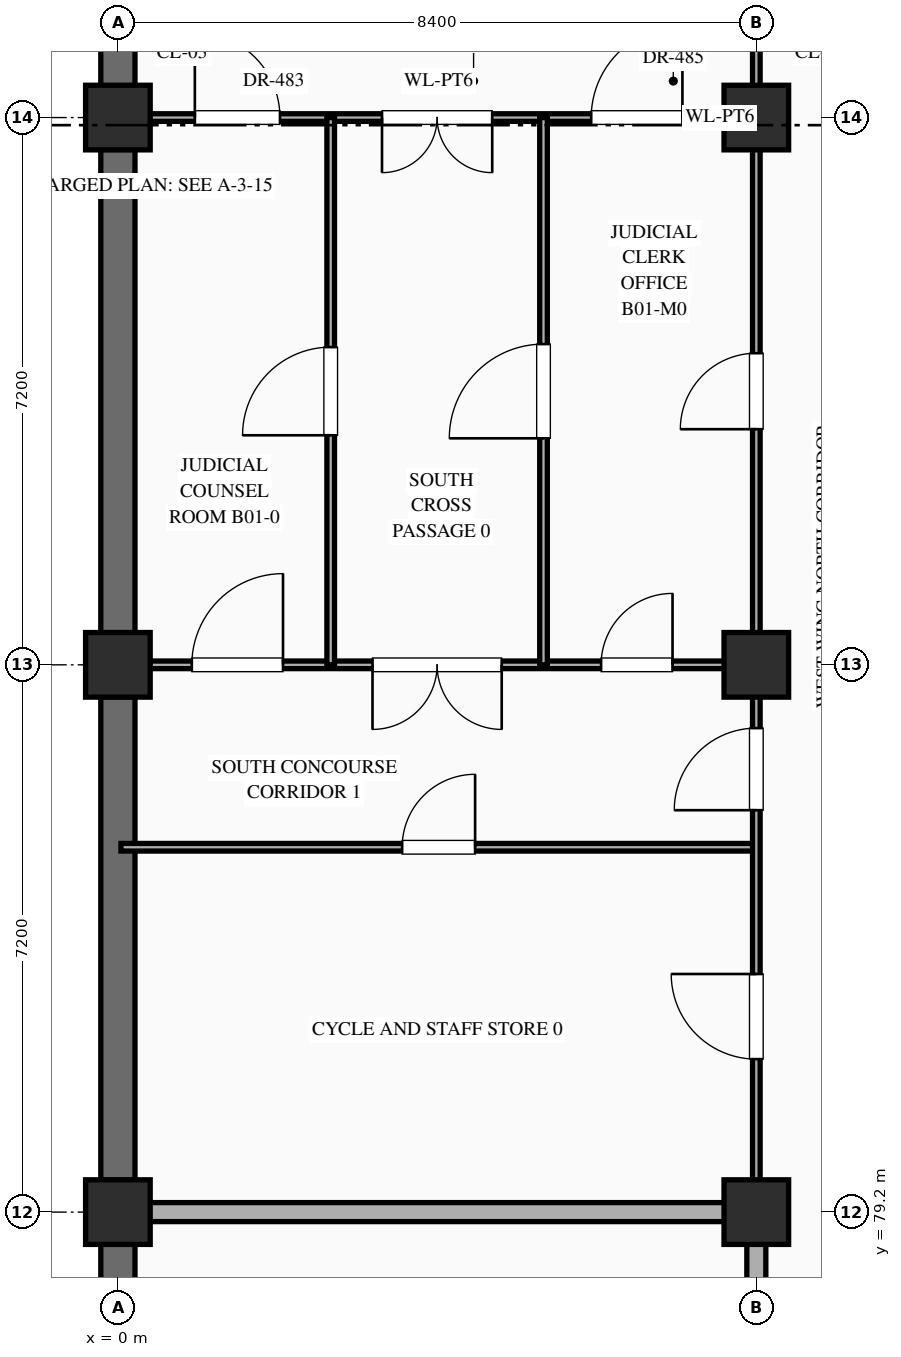
"""IFC4 building model, lengths in metres.
Left out: names, types, materials, properties, quantities, classifications, styles, units other than length and angle.
Written with IfcOpenShell. Run it as: python <this file> out.ifc"""

import sys

from ifc_helpers import new_model, si_unit, direction, frame, frame_2d, origin, origin_2d, place, context, subcontext, project, spatial, rectangle, extrude, element, fill, save


model = new_model("IFC4")
c1 = context("Model", 3, precision=1e-05, world=origin(), true_north=direction((0.0, 1.0)))
c2 = subcontext(c1, "Body", "Model", "MODEL_VIEW")
j1 = project(units=[si_unit("LENGTHUNIT", "METRE"), si_unit("PLANEANGLEUNIT", "RADIAN")], contexts=[c1])
p1 = place(None, origin())
s1 = spatial("IfcSite", under=j1, at=p1, CompositionType="ELEMENT")
p2 = place(p1, origin())
s2 = spatial("IfcBuilding", under=s1, at=p2, CompositionType="ELEMENT")
p3 = place(p2, frame((0.0, 0.0, -5.4)))
s3 = spatial("IfcBuildingStorey", under=s2, at=p3, CompositionType="ELEMENT", Elevation=-5.4)
for number, where, z_axis, x_axis in (
    (1, (0.0, 79.2, 0.0), (0.0, 0.0, 1.0), (1.0, 0.0, 0.0)),
    (2, (0.0, 86.4, 0.0), (0.0, 0.0, 1.0), (1.0, 0.0, 0.0)),
    (3, (0.0, 93.6, 0.0), (0.0, 0.0, 1.0), (1.0, 0.0, 0.0)),
    (4, (8.4, 79.2, 0.0), (0.0, 0.0, 1.0), (1.0, 0.0, 0.0)),
    (5, (8.4, 86.4, 0.0), (0.0, 0.0, 1.0), (1.0, 0.0, 0.0)),
    (6, (8.4, 93.6, 0.0), (0.0, 0.0, 1.0), (1.0, 0.0, 0.0)),
):
    element("IfcColumn", number, at=place(p3, frame(where, z_axis=z_axis, x_axis=x_axis)), inside=s3, PredefinedType="COLUMN", context=c2, shape_type="SweptSolid", body=[
        extrude(rectangle(XDim=0.85, YDim=0.85, at=origin_2d()), origin(), (0.0, 0.0, 1.0), 5.4),
    ])
p4 = place(p3, frame((0.0, 72.42, 0.0), z_axis=(0.0, 0.0, 1.0), x_axis=(0.0, 1.0, 0.0)))
e7 = element("IfcWall", 7, at=p4, inside=s3, PredefinedType="USERDEFINED", context=c2, shape_type="SweptSolid", body=[
    extrude(rectangle(XDim=6.36, YDim=0.45, at=frame_2d((3.18, 0.0))), origin(), (0.0, 0.0, 1.0), 5.1),
])
for number, where, z_axis, x_axis in (
    (8, (0.0, 79.62, 0.0), (0.0, 0.0, 1.0), (0.0, 1.0, 0.0)),
    (9, (0.0, 86.82, 0.0), (0.0, 0.0, 1.0), (0.0, 1.0, 0.0)),
    (10, (0.0, 94.02, 0.0), (0.0, 0.0, 1.0), (0.0, 1.0, 0.0)),
):
    element("IfcWall", number, at=place(p3, frame(where, z_axis=z_axis, x_axis=x_axis)), inside=s3, PredefinedType="USERDEFINED", context=c2, shape_type="SweptSolid", body=[
        extrude(rectangle(XDim=6.36, YDim=0.45, at=frame_2d((3.18, 0.0))), origin(), (0.0, 0.0, 1.0), 5.1),
    ])
p5 = place(p3, frame((0.04, 79.2, 0.0), z_axis=(0.0, 0.0, 1.0), x_axis=(1.0, 0.0, 0.0)))
e11 = element("IfcWall", 11, at=p5, inside=s3, PredefinedType="STANDARD", context=c2, shape_type="SweptSolid", body=[
    extrude(rectangle(XDim=8.36, YDim=0.25, at=frame_2d((4.18, 0.0))), origin(), (0.0, 0.0, 1.0), 4.25),
])
p6 = place(p3, frame((0.04, 84.0, 0.0), z_axis=(0.0, 0.0, 1.0), x_axis=(1.0, 0.0, 0.0)))
e12 = element("IfcWall", 12, at=p6, inside=s3, PredefinedType="STANDARD", context=c2, shape_type="SweptSolid", body=[
    extrude(rectangle(XDim=8.36, YDim=0.1, at=frame_2d((4.18, 0.0))), origin(), (0.0, 0.0, 1.0), 5.1),
])
p7 = place(p6, frame((3.7, 0.0, 0.0)))
e13 = element("IfcOpeningElement", 13, at=p7, cuts=e12, PredefinedType="OPENING", context=c2, shape_type="SweptSolid", body=[
    extrude(rectangle(XDim=0.96, YDim=2.2, at=frame_2d((0.48, 1.1))), frame((0.0, 0.062, 0.0), z_axis=(0.0, -1.0, 0.0), x_axis=(1.0, 0.0, 0.0)), (0.0, 0.0, 1.0), 0.124),
])
p8 = place(p3, frame((0.04, 86.4, 0.0), z_axis=(0.0, 0.0, 1.0), x_axis=(1.0, 0.0, 0.0)))
e14 = element("IfcWall", 14, at=p8, inside=s3, PredefinedType="STANDARD", context=c2, shape_type="SweptSolid", body=[
    extrude(rectangle(XDim=8.36, YDim=0.1, at=frame_2d((4.18, 0.0))), origin(), (0.0, 0.0, 1.0), 4.25),
])
p9 = place(p8, frame((0.933, 0.0, 0.0)))
e15 = element("IfcOpeningElement", 15, at=p9, cuts=e14, PredefinedType="OPENING", context=c2, shape_type="SweptSolid", body=[
    extrude(rectangle(XDim=1.2, YDim=2.35, at=frame_2d((0.6, 1.175))), frame((0.0, 0.062, 0.0), z_axis=(0.0, -1.0, 0.0), x_axis=(1.0, 0.0, 0.0)), (0.0, 0.0, 1.0), 0.124),
])
p10 = place(p8, frame((3.31, 0.0, 0.0)))
e16 = element("IfcOpeningElement", 16, at=p10, cuts=e14, PredefinedType="OPENING", context=c2, shape_type="SweptSolid", body=[
    extrude(rectangle(XDim=1.7, YDim=2.45, at=frame_2d((0.85, 1.225))), frame((0.0, 0.062, 0.0), z_axis=(0.0, -1.0, 0.0), x_axis=(1.0, 0.0, 0.0)), (0.0, 0.0, 1.0), 0.124),
])
p11 = place(p8, frame((6.317, 0.0, 0.0)))
e17 = element("IfcOpeningElement", 17, at=p11, cuts=e14, PredefinedType="OPENING", context=c2, shape_type="SweptSolid", body=[
    extrude(rectangle(XDim=0.94, YDim=2.3, at=frame_2d((0.47, 1.15))), frame((0.0, 0.062, 0.0), z_axis=(0.0, -1.0, 0.0), x_axis=(1.0, 0.0, 0.0)), (0.0, 0.0, 1.0), 0.124),
])
p12 = place(p3, frame((0.04, 93.6, 0.0), z_axis=(0.0, 0.0, 1.0), x_axis=(1.0, 0.0, 0.0)))
e18 = element("IfcWall", 18, at=p12, inside=s3, PredefinedType="STANDARD", context=c2, shape_type="SweptSolid", body=[
    extrude(rectangle(XDim=8.36, YDim=0.1, at=frame_2d((4.18, 0.0))), origin(), (0.0, 0.0, 1.0), 4.25),
])
p13 = place(p12, frame((0.972, 0.0, 0.0)))
e19 = element("IfcOpeningElement", 19, at=p13, cuts=e18, PredefinedType="OPENING", context=c2, shape_type="SweptSolid", body=[
    extrude(rectangle(XDim=1.12, YDim=2.25, at=frame_2d((0.56, 1.125))), frame((0.0, 0.062, 0.0), z_axis=(0.0, -1.0, 0.0), x_axis=(1.0, 0.0, 0.0)), (0.0, 0.0, 1.0), 0.124),
])
p14 = place(p12, frame((3.435, 0.0, 0.0)))
e20 = element("IfcOpeningElement", 20, at=p14, cuts=e18, PredefinedType="OPENING", context=c2, shape_type="SweptSolid", body=[
    extrude(rectangle(XDim=1.45, YDim=2.3, at=frame_2d((0.725, 1.15))), frame((0.0, 0.062, 0.0), z_axis=(0.0, -1.0, 0.0), x_axis=(1.0, 0.0, 0.0)), (0.0, 0.0, 1.0), 0.124),
])
p15 = place(p12, frame((6.188, 0.0, 0.0)))
e21 = element("IfcOpeningElement", 21, at=p15, cuts=e18, PredefinedType="OPENING", context=c2, shape_type="SweptSolid", body=[
    extrude(rectangle(XDim=1.2, YDim=2.35, at=frame_2d((0.6, 1.175))), frame((0.0, 0.062, 0.0), z_axis=(0.0, -1.0, 0.0), x_axis=(1.0, 0.0, 0.0)), (0.0, 0.0, 1.0), 0.124),
])
p16 = place(p3, frame((2.8, 86.4, 0.0), z_axis=(0.0, 0.0, 1.0), x_axis=(0.0, 1.0, 0.0)))
e22 = element("IfcWall", 22, at=p16, inside=s3, PredefinedType="STANDARD", context=c2, shape_type="SweptSolid", body=[
    extrude(rectangle(XDim=7.2, YDim=0.1, at=frame_2d((3.6, 0.0))), origin(), (0.0, 0.0, 1.0), 5.1),
])
p17 = place(p16, frame((3.02, 0.0, 0.0)))
e23 = element("IfcOpeningElement", 23, at=p17, cuts=e22, PredefinedType="OPENING", context=c2, shape_type="SweptSolid", body=[
    extrude(rectangle(XDim=1.16, YDim=2.3, at=frame_2d((0.58, 1.15))), frame((0.0, 0.062, 0.0), z_axis=(0.0, -1.0, 0.0), x_axis=(1.0, 0.0, 0.0)), (0.0, 0.0, 1.0), 0.124),
])
p18 = place(p3, frame((5.6, 86.4, 0.0), z_axis=(0.0, 0.0, 1.0), x_axis=(0.0, 1.0, 0.0)))
e24 = element("IfcWall", 24, at=p18, inside=s3, PredefinedType="STANDARD", context=c2, shape_type="SweptSolid", body=[
    extrude(rectangle(XDim=7.2, YDim=0.1, at=frame_2d((3.6, 0.0))), origin(), (0.0, 0.0, 1.0), 5.1),
])
p19 = place(p18, frame((2.98, 0.0, 0.0)))
e25 = element("IfcOpeningElement", 25, at=p19, cuts=e24, PredefinedType="OPENING", context=c2, shape_type="SweptSolid", body=[
    extrude(rectangle(XDim=1.24, YDim=2.3, at=frame_2d((0.62, 1.15))), frame((0.0, 0.062, 0.0), z_axis=(0.0, -1.0, 0.0), x_axis=(1.0, 0.0, 0.0)), (0.0, 0.0, 1.0), 0.124),
])
p20 = place(p3, frame((8.4, 40.8, 0.0), z_axis=(0.0, 0.0, 1.0), x_axis=(0.0, 1.0, 0.0)))
e26 = element("IfcWall", 26, at=p20, inside=s3, PredefinedType="STANDARD", context=c2, shape_type="SweptSolid", body=[
    extrude(rectangle(XDim=38.4, YDim=0.25, at=frame_2d((19.2, 0.0))), origin(), (0.0, 0.0, 1.0), 4.35),
])
p21 = place(p20, frame((0.528, 0.0, 0.0)))
e27 = element("IfcOpeningElement", 27, at=p21, cuts=e26, PredefinedType="OPENING", context=c2, shape_type="SweptSolid", body=[
    extrude(rectangle(XDim=1.0, YDim=2.2, at=frame_2d((0.5, 1.1))), frame((0.0, 0.137, 0.0), z_axis=(0.0, -1.0, 0.0), x_axis=(1.0, 0.0, 0.0)), (0.0, 0.0, 1.0), 0.274),
])
p22 = place(p20, frame((27.1, 0.0, 0.0)))
e28 = element("IfcOpeningElement", 28, at=p22, cuts=e26, PredefinedType="OPENING", context=c2, shape_type="SweptSolid", body=[
    extrude(rectangle(XDim=1.0, YDim=2.2, at=frame_2d((0.5, 1.1))), frame((0.0, 0.137, 0.0), z_axis=(0.0, -1.0, 0.0), x_axis=(1.0, 0.0, 0.0)), (0.0, 0.0, 1.0), 0.274),
])
p23 = place(p20, frame((12.65, 0.0, 0.0)))
e29 = element("IfcOpeningElement", 29, at=p23, cuts=e26, PredefinedType="OPENING", context=c2, shape_type="SweptSolid", body=[
    extrude(rectangle(XDim=1.1, YDim=2.2, at=frame_2d((0.55, 1.1))), frame((0.0, 0.137, 0.0), z_axis=(0.0, -1.0, 0.0), x_axis=(1.0, 0.0, 0.0)), (0.0, 0.0, 1.0), 0.274),
])
p24 = place(p3, frame((8.4, 79.2, 0.0), z_axis=(0.0, 0.0, 1.0), x_axis=(0.0, 1.0, 0.0)))
e30 = element("IfcWall", 30, at=p24, inside=s3, PredefinedType="STANDARD", context=c2, shape_type="SweptSolid", body=[
    extrude(rectangle(XDim=28.8, YDim=0.1, at=frame_2d((14.4, 0.0))), origin(), (0.0, 0.0, 1.0), 4.35),
])
p25 = place(p24, frame((22.522, 0.0, 0.0)))
e31 = element("IfcOpeningElement", 31, at=p25, cuts=e30, PredefinedType="OPENING", context=c2, shape_type="SweptSolid", body=[
    extrude(rectangle(XDim=0.9, YDim=2.15, at=frame_2d((0.45, 1.075))), frame((0.0, 0.062, 0.0), z_axis=(0.0, -1.0, 0.0), x_axis=(1.0, 0.0, 0.0)), (0.0, 0.0, 1.0), 0.124),
])
p26 = place(p24, frame((25.798, 0.0, 0.0)))
e32 = element("IfcOpeningElement", 32, at=p26, cuts=e30, PredefinedType="OPENING", context=c2, shape_type="SweptSolid", body=[
    extrude(rectangle(XDim=0.86, YDim=2.1, at=frame_2d((0.43, 1.05))), frame((0.0, 0.062, 0.0), z_axis=(0.0, -1.0, 0.0), x_axis=(1.0, 0.0, 0.0)), (0.0, 0.0, 1.0), 0.124),
])
p27 = place(p24, frame((15.312, 0.0, 0.0)))
e33 = element("IfcOpeningElement", 33, at=p27, cuts=e30, PredefinedType="OPENING", context=c2, shape_type="SweptSolid", body=[
    extrude(rectangle(XDim=0.92, YDim=2.15, at=frame_2d((0.46, 1.075))), frame((0.0, 0.062, 0.0), z_axis=(0.0, -1.0, 0.0), x_axis=(1.0, 0.0, 0.0)), (0.0, 0.0, 1.0), 0.124),
])
p28 = place(p24, frame((18.548, 0.0, 0.0)))
e34 = element("IfcOpeningElement", 34, at=p28, cuts=e30, PredefinedType="OPENING", context=c2, shape_type="SweptSolid", body=[
    extrude(rectangle(XDim=0.96, YDim=2.2, at=frame_2d((0.48, 1.1))), frame((0.0, 0.062, 0.0), z_axis=(0.0, -1.0, 0.0), x_axis=(1.0, 0.0, 0.0)), (0.0, 0.0, 1.0), 0.124),
])
p29 = place(p24, frame((10.3, 0.0, 0.0)))
e35 = element("IfcOpeningElement", 35, at=p29, cuts=e30, PredefinedType="OPENING", context=c2, shape_type="SweptSolid", body=[
    extrude(rectangle(XDim=1.0, YDim=2.25, at=frame_2d((0.5, 1.125))), frame((0.0, 0.062, 0.0), z_axis=(0.0, -1.0, 0.0), x_axis=(1.0, 0.0, 0.0)), (0.0, 0.0, 1.0), 0.124),
])
p30 = place(p24, frame((5.288, 0.0, 0.0)))
e36 = element("IfcOpeningElement", 36, at=p30, cuts=e30, PredefinedType="OPENING", context=c2, shape_type="SweptSolid", body=[
    extrude(rectangle(XDim=1.08, YDim=2.25, at=frame_2d((0.54, 1.125))), frame((0.0, 0.062, 0.0), z_axis=(0.0, -1.0, 0.0), x_axis=(1.0, 0.0, 0.0)), (0.0, 0.0, 1.0), 0.124),
])
p31 = place(p24, frame((2.012, 0.0, 0.0)))
e37 = element("IfcOpeningElement", 37, at=p31, cuts=e30, PredefinedType="OPENING", context=c2, shape_type="SweptSolid", body=[
    extrude(rectangle(XDim=1.12, YDim=2.25, at=frame_2d((0.56, 1.125))), frame((0.0, 0.062, 0.0), z_axis=(0.0, -1.0, 0.0), x_axis=(1.0, 0.0, 0.0)), (0.0, 0.0, 1.0), 0.124),
])
p32 = place(p29, origin())
e38 = element("IfcDoor", 38, at=p32, inside=s3, OperationType="SINGLE_SWING_LEFT", PredefinedType="DOOR", context=c2, shape_type="SweptSolid", body=[
    extrude(rectangle(XDim=1.0, YDim=2.25, at=frame_2d((0.5, 1.125))), frame((0.0, 0.025, 0.0), z_axis=(0.0, -1.0, 0.0), x_axis=(1.0, 0.0, 0.0)), (0.0, 0.0, 1.0), 0.05),
])
fill(e35, e38)
p33 = place(p30, origin())
e39 = element("IfcDoor", 39, at=p33, inside=s3, OperationType="SINGLE_SWING_LEFT", PredefinedType="DOOR", context=c2, shape_type="SweptSolid", body=[
    extrude(rectangle(XDim=1.08, YDim=2.25, at=frame_2d((0.54, 1.125))), frame((0.0, 0.025, 0.0), z_axis=(0.0, -1.0, 0.0), x_axis=(1.0, 0.0, 0.0)), (0.0, 0.0, 1.0), 0.05),
])
fill(e36, e39)
p34 = place(p31, origin())
e40 = element("IfcDoor", 40, at=p34, inside=s3, OperationType="SINGLE_SWING_RIGHT", PredefinedType="DOOR", context=c2, shape_type="SweptSolid", body=[
    extrude(rectangle(XDim=1.12, YDim=2.25, at=frame_2d((0.56, 1.125))), frame((0.0, 0.025, 0.0), z_axis=(0.0, -1.0, 0.0), x_axis=(1.0, 0.0, 0.0)), (0.0, 0.0, 1.0), 0.05),
])
fill(e37, e40)
p35 = place(p13, origin())
e41 = element("IfcDoor", 41, at=p35, inside=s3, OperationType="SINGLE_SWING_LEFT", PredefinedType="DOOR", context=c2, shape_type="SweptSolid", body=[
    extrude(rectangle(XDim=1.12, YDim=2.25, at=frame_2d((0.56, 1.125))), frame((0.0, 0.025, 0.0), z_axis=(0.0, -1.0, 0.0), x_axis=(1.0, 0.0, 0.0)), (0.0, 0.0, 1.0), 0.05),
])
fill(e19, e41)
p36 = place(p14, frame((1.45, 0.0, 0.0), z_axis=(0.0, 0.0, 1.0), x_axis=(-1.0, 0.0, 0.0)))
e42 = element("IfcDoor", 42, at=p36, inside=s3, OperationType="DOUBLE_DOOR_SINGLE_SWING", PredefinedType="DOOR", context=c2, shape_type="SweptSolid", body=[
    extrude(rectangle(XDim=1.45, YDim=2.3, at=frame_2d((0.725, 1.15))), frame((0.0, 0.025, 0.0), z_axis=(0.0, -1.0, 0.0), x_axis=(1.0, 0.0, 0.0)), (0.0, 0.0, 1.0), 0.05),
])
fill(e20, e42)
p37 = place(p15, origin())
e43 = element("IfcDoor", 43, at=p37, inside=s3, OperationType="SINGLE_SWING_RIGHT", PredefinedType="DOOR", context=c2, shape_type="SweptSolid", body=[
    extrude(rectangle(XDim=1.2, YDim=2.35, at=frame_2d((0.6, 1.175))), frame((0.0, 0.025, 0.0), z_axis=(0.0, -1.0, 0.0), x_axis=(1.0, 0.0, 0.0)), (0.0, 0.0, 1.0), 0.05),
])
fill(e21, e43)
p38 = place(p17, origin())
e44 = element("IfcDoor", 44, at=p38, inside=s3, OperationType="SINGLE_SWING_LEFT", PredefinedType="DOOR", context=c2, shape_type="SweptSolid", body=[
    extrude(rectangle(XDim=1.16, YDim=2.3, at=frame_2d((0.58, 1.15))), frame((0.0, 0.025, 0.0), z_axis=(0.0, -1.0, 0.0), x_axis=(1.0, 0.0, 0.0)), (0.0, 0.0, 1.0), 0.05),
])
fill(e23, e44)
p39 = place(p9, origin())
e45 = element("IfcDoor", 45, at=p39, inside=s3, OperationType="SINGLE_SWING_RIGHT", PredefinedType="DOOR", context=c2, shape_type="SweptSolid", body=[
    extrude(rectangle(XDim=1.2, YDim=2.35, at=frame_2d((0.6, 1.175))), frame((0.0, 0.025, 0.0), z_axis=(0.0, -1.0, 0.0), x_axis=(1.0, 0.0, 0.0)), (0.0, 0.0, 1.0), 0.05),
])
fill(e15, e45)
p40 = place(p19, origin())
e46 = element("IfcDoor", 46, at=p40, inside=s3, OperationType="SINGLE_SWING_LEFT", PredefinedType="DOOR", context=c2, shape_type="SweptSolid", body=[
    extrude(rectangle(XDim=1.24, YDim=2.3, at=frame_2d((0.62, 1.15))), frame((0.0, 0.025, 0.0), z_axis=(0.0, -1.0, 0.0), x_axis=(1.0, 0.0, 0.0)), (0.0, 0.0, 1.0), 0.05),
])
fill(e25, e46)
p41 = place(p10, frame((1.7, 0.0, 0.0), z_axis=(0.0, 0.0, 1.0), x_axis=(-1.0, 0.0, 0.0)))
e47 = element("IfcDoor", 47, at=p41, inside=s3, OperationType="DOUBLE_DOOR_SINGLE_SWING", PredefinedType="DOOR", context=c2, shape_type="SweptSolid", body=[
    extrude(rectangle(XDim=1.7, YDim=2.45, at=frame_2d((0.85, 1.225))), frame((0.0, 0.025, 0.0), z_axis=(0.0, -1.0, 0.0), x_axis=(1.0, 0.0, 0.0)), (0.0, 0.0, 1.0), 0.05),
])
fill(e16, e47)
p42 = place(p11, origin())
e48 = element("IfcDoor", 48, at=p42, inside=s3, OperationType="SINGLE_SWING_RIGHT", PredefinedType="DOOR", context=c2, shape_type="SweptSolid", body=[
    extrude(rectangle(XDim=0.94, YDim=2.3, at=frame_2d((0.47, 1.15))), frame((0.0, 0.025, 0.0), z_axis=(0.0, -1.0, 0.0), x_axis=(1.0, 0.0, 0.0)), (0.0, 0.0, 1.0), 0.05),
])
fill(e17, e48)
p43 = place(p7, origin())
e49 = element("IfcDoor", 49, at=p43, inside=s3, OperationType="SINGLE_SWING_RIGHT", PredefinedType="DOOR", context=c2, shape_type="SweptSolid", body=[
    extrude(rectangle(XDim=0.96, YDim=2.2, at=frame_2d((0.48, 1.1))), frame((0.0, 0.025, 0.0), z_axis=(0.0, -1.0, 0.0), x_axis=(1.0, 0.0, 0.0)), (0.0, 0.0, 1.0), 0.05),
])
fill(e13, e49)
save(model, sys.argv[1])
